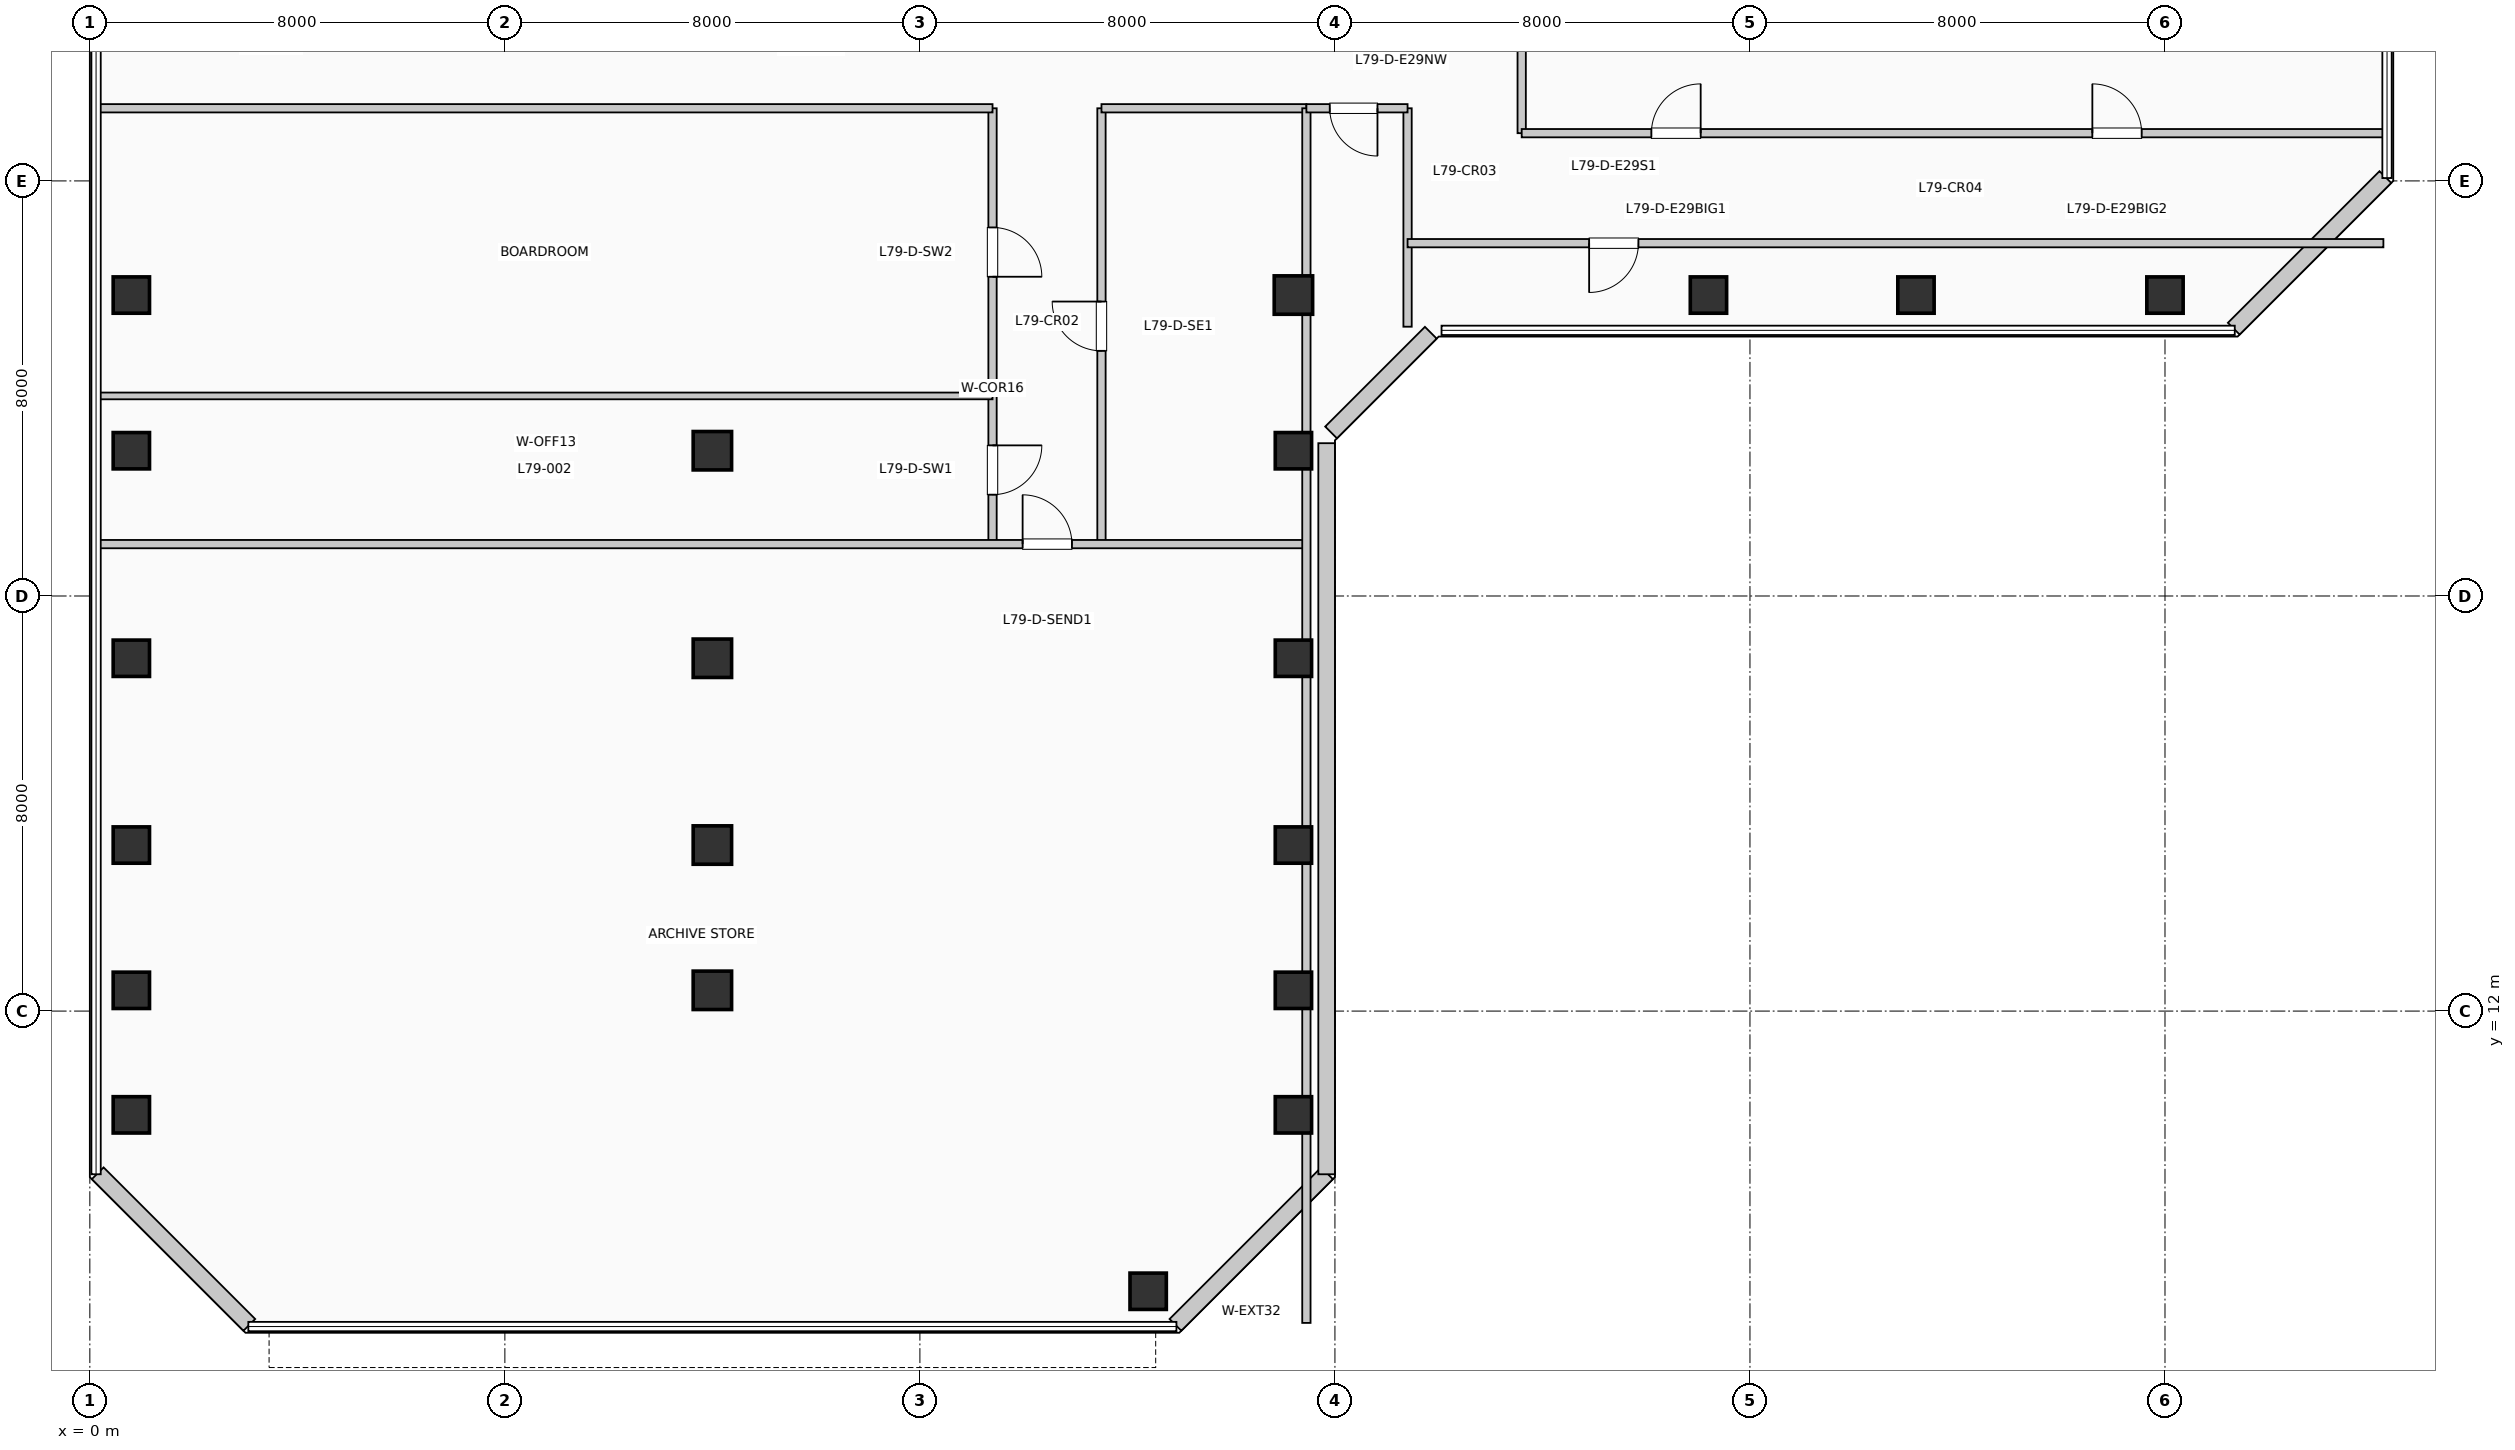
"""IFC4 building model, lengths in metres.
Left out: names, types, materials, properties, quantities, classifications, styles, units other than length and angle.
Written with IfcOpenShell. Run it as: python <this file> out.ifc"""

import sys

from ifc_helpers import new_model, si_unit, direction, frame, frame_2d, origin, origin_2d, place, context, subcontext, project, spatial, rectangle, extrude, element, fill, save


model = new_model("IFC4")
c1 = context("Model", 3, precision=1e-05, world=origin(), true_north=direction((0.0, 1.0)))
c2 = subcontext(c1, "Body", "Model", "MODEL_VIEW")
j1 = project(units=[si_unit("LENGTHUNIT", "METRE"), si_unit("PLANEANGLEUNIT", "RADIAN")], contexts=[c1])
p1 = place(None, origin())
s1 = spatial("IfcSite", under=j1, at=p1, CompositionType="ELEMENT")
p2 = place(p1, origin())
s2 = spatial("IfcBuilding", under=s1, at=p2, CompositionType="ELEMENT")
p3 = place(p2, frame((0.0, 0.0, 323.73)))
s3 = spatial("IfcBuildingStorey", under=s2, at=p3, CompositionType="ELEMENT", Elevation=323.73)
for number, where, z_axis, x_axis in (
    (1, (0.8, 10.0, 0.0), (0.0, 0.0, 1.0), (1.0, 0.0, 0.0)),
    (2, (0.8, 12.4, 0.0), (0.0, 0.0, 1.0), (1.0, 0.0, 0.0)),
    (3, (0.8, 15.2, 0.0), (0.0, 0.0, 1.0), (1.0, 0.0, 0.0)),
    (4, (0.8, 18.8, 0.0), (0.0, 0.0, 1.0), (1.0, 0.0, 0.0)),
    (5, (0.8, 22.8, 0.0), (0.0, 0.0, 1.0), (1.0, 0.0, 0.0)),
    (6, (0.8, 25.8, 0.0), (0.0, 0.0, 1.0), (1.0, 0.0, 0.0)),
):
    element("IfcColumn", number, at=place(p3, frame(where, z_axis=z_axis, x_axis=x_axis)), inside=s3, PredefinedType="COLUMN", context=c2, shape_type="SweptSolid", body=[
        extrude(rectangle(XDim=0.7, YDim=0.7, at=origin_2d()), origin(), (0.0, 0.0, 1.0), 3.96),
    ])
for number, where, z_axis, x_axis in (
    (7, (12.0, 12.4, 0.0), (0.0, 0.0, 1.0), (1.0, 0.0, 0.0)),
    (8, (12.0, 15.2, 0.0), (0.0, 0.0, 1.0), (1.0, 0.0, 0.0)),
    (9, (12.0, 18.8, 0.0), (0.0, 0.0, 1.0), (1.0, 0.0, 0.0)),
    (10, (12.0, 22.8, 0.0), (0.0, 0.0, 1.0), (1.0, 0.0, 0.0)),
):
    element("IfcColumn", number, at=place(p3, frame(where, z_axis=z_axis, x_axis=x_axis)), inside=s3, PredefinedType="COLUMN", context=c2, shape_type="SweptSolid", body=[
        extrude(rectangle(XDim=0.74, YDim=0.74, at=origin_2d()), origin(), (0.0, 0.0, 1.0), 3.96),
    ])
for number, where, z_axis, x_axis in (
    (11, (20.4, 6.6, 0.0), (0.0, 0.0, 1.0), (1.0, 0.0, 0.0)),
    (12, (23.2, 10.0, 0.0), (0.0, 0.0, 1.0), (1.0, 0.0, 0.0)),
    (13, (23.2, 12.4, 0.0), (0.0, 0.0, 1.0), (1.0, 0.0, 0.0)),
    (14, (23.2, 15.2, 0.0), (0.0, 0.0, 1.0), (1.0, 0.0, 0.0)),
    (15, (23.2, 18.8, 0.0), (0.0, 0.0, 1.0), (1.0, 0.0, 0.0)),
    (16, (23.2, 22.8, 0.0), (0.0, 0.0, 1.0), (1.0, 0.0, 0.0)),
):
    element("IfcColumn", number, at=place(p3, frame(where, z_axis=z_axis, x_axis=x_axis)), inside=s3, PredefinedType="COLUMN", context=c2, shape_type="SweptSolid", body=[
        extrude(rectangle(XDim=0.7, YDim=0.7, at=origin_2d()), origin(), (0.0, 0.0, 1.0), 3.96),
    ])
p4 = place(p3, frame((23.2, 25.8, 0.0), z_axis=(0.0, 0.0, 1.0), x_axis=(1.0, 0.0, 0.0)))
e17 = element("IfcColumn", 17, at=p4, inside=s3, PredefinedType="COLUMN", context=c2, shape_type="SweptSolid", body=[
    extrude(rectangle(XDim=0.74, YDim=0.74, at=origin_2d()), origin(), (0.0, 0.0, 1.0), 3.96),
])
for number, where, z_axis, x_axis in (
    (18, (31.2, 25.8, 0.0), (0.0, 0.0, 1.0), (1.0, 0.0, 0.0)),
    (19, (35.2, 25.8, 0.0), (0.0, 0.0, 1.0), (1.0, 0.0, 0.0)),
    (20, (40.0, 25.8, 0.0), (0.0, 0.0, 1.0), (1.0, 0.0, 0.0)),
):
    element("IfcColumn", number, at=place(p3, frame(where, z_axis=z_axis, x_axis=x_axis)), inside=s3, PredefinedType="COLUMN", context=c2, shape_type="SweptSolid", body=[
        extrude(rectangle(XDim=0.7, YDim=0.7, at=origin_2d()), origin(), (0.0, 0.0, 1.0), 3.96),
    ])
p5 = place(p3, frame((20.926, 5.952, 0.0), z_axis=(0.0, 0.0, 1.0), x_axis=(0.707077242712, 0.707136318428, 0.0)))
e21 = element("IfcWall", 21, at=p5, inside=s3, PredefinedType="SOLIDWALL", context=c2, shape_type="SweptSolid", body=[
    extrude(rectangle(XDim=4.133, YDim=0.32, at=frame_2d((2.066, 0.0))), origin(), (0.0, 0.0, 1.0), 3.74),
])
p6 = place(p3, frame((23.84, 8.855, 0.0), z_axis=(0.0, 0.0, 1.0), x_axis=(0.0, 1.0, 0.0)))
e22 = element("IfcWall", 22, at=p6, inside=s3, PredefinedType="SOLIDWALL", context=c2, shape_type="SweptSolid", body=[
    extrude(rectangle(XDim=14.09, YDim=0.32, at=frame_2d((7.045, 0.0))), origin(), (0.0, 0.0, 1.0), 3.74),
])
p7 = place(p3, frame((23.926, 23.152, 0.0), z_axis=(0.0, 0.0, 1.0), x_axis=(0.707106781187, 0.707106781187, 0.0)))
e23 = element("IfcWall", 23, at=p7, inside=s3, PredefinedType="SOLIDWALL", context=c2, shape_type="SweptSolid", body=[
    extrude(rectangle(XDim=2.718, YDim=0.32, at=frame_2d((1.359, 0.0))), origin(), (0.0, 0.0, 1.0), 3.74),
])
for number, where, z_axis, x_axis in (
    (24, (41.326, 25.152, 0.0), (0.0, 0.0, 1.0), (0.707, 0.707, 0.0)),
    (25, (0.152, 8.874, 0.0), (0.0, 0.0, 1.0), (0.707, -0.707, 0.0)),
):
    element("IfcWall", number, at=place(p3, frame(where, z_axis=z_axis, x_axis=x_axis)), inside=s3, PredefinedType="SOLIDWALL", context=c2, shape_type="SweptSolid", body=[
        extrude(rectangle(XDim=4.133, YDim=0.32, at=frame_2d((2.066, 0.0))), origin(), (0.0, 0.0, 1.0), 3.74),
    ])
p8 = place(p3, frame((17.4, 21.0, 0.0), z_axis=(0.0, 0.0, 1.0), x_axis=(0.0, 1.0, 0.0)))
e26 = element("IfcWall", 26, at=p8, inside=s3, PredefinedType="PARTITIONING", context=c2, shape_type="SweptSolid", body=[
    extrude(rectangle(XDim=8.4, YDim=0.16, at=frame_2d((4.2, 0.0))), origin(), (0.0, 0.0, 1.0), 3.74),
])
p9 = place(p8, frame((1.903, 0.0, 0.0), z_axis=(0.0, 0.0, 1.0), x_axis=(-1.0, 0.0, 0.0)))
e27 = element("IfcOpeningElement", 27, at=p9, cuts=e26, PredefinedType="OPENING", context=c2, shape_type="SweptSolid", body=[
    extrude(rectangle(XDim=0.95, YDim=2.15, at=frame_2d((0.475, 1.075))), frame((0.0, 0.09, 0.0), z_axis=(0.0, -1.0, 0.0), x_axis=(1.0, 0.0, 0.0)), (0.0, 0.0, 1.0), 0.18),
])
p10 = place(p8, frame((6.103, 0.0, 0.0), z_axis=(0.0, 0.0, 1.0), x_axis=(-1.0, 0.0, 0.0)))
e28 = element("IfcOpeningElement", 28, at=p10, cuts=e26, PredefinedType="OPENING", context=c2, shape_type="SweptSolid", body=[
    extrude(rectangle(XDim=0.95, YDim=2.15, at=frame_2d((0.475, 1.075))), frame((0.0, 0.09, 0.0), z_axis=(0.0, -1.0, 0.0), x_axis=(1.0, 0.0, 0.0)), (0.0, 0.0, 1.0), 0.18),
])
p11 = place(p3, frame((19.5, 21.0, 0.0), z_axis=(0.0, 0.0, 1.0), x_axis=(0.0, 1.0, 0.0)))
e29 = element("IfcWall", 29, at=p11, inside=s3, PredefinedType="PARTITIONING", context=c2, shape_type="SweptSolid", body=[
    extrude(rectangle(XDim=8.4, YDim=0.16, at=frame_2d((4.2, 0.0))), origin(), (0.0, 0.0, 1.0), 3.74),
])
p12 = place(p11, frame((3.725, 0.0, 0.0)))
e30 = element("IfcOpeningElement", 30, at=p12, cuts=e29, PredefinedType="OPENING", context=c2, shape_type="SweptSolid", body=[
    extrude(rectangle(XDim=0.95, YDim=2.15, at=frame_2d((0.475, 1.075))), frame((0.0, 0.09, 0.0), z_axis=(0.0, -1.0, 0.0), x_axis=(1.0, 0.0, 0.0)), (0.0, 0.0, 1.0), 0.18),
])
p13 = place(p3, frame((0.19, 21.0, 0.0), z_axis=(0.0, 0.0, 1.0), x_axis=(1.0, 0.0, 0.0)))
e31 = element("IfcWall", 31, at=p13, inside=s3, PredefinedType="PARTITIONING", context=c2, shape_type="SweptSolid", body=[
    extrude(rectangle(XDim=23.26, YDim=0.16, at=frame_2d((11.63, 0.0))), origin(), (0.0, 0.0, 1.0), 3.74),
])
p14 = place(p13, frame((17.79, 0.0, 0.0)))
e32 = element("IfcOpeningElement", 32, at=p14, cuts=e31, PredefinedType="OPENING", context=c2, shape_type="SweptSolid", body=[
    extrude(rectangle(XDim=0.95, YDim=2.15, at=frame_2d((0.475, 1.075))), frame((0.0, 0.09, 0.0), z_axis=(0.0, -1.0, 0.0), x_axis=(1.0, 0.0, 0.0)), (0.0, 0.0, 1.0), 0.18),
])
p15 = place(p3, frame((0.19, 29.4, 0.0), z_axis=(0.0, 0.0, 1.0), x_axis=(1.0, 0.0, 0.0)))
e33 = element("IfcWall", 33, at=p15, inside=s3, PredefinedType="PARTITIONING", context=c2, shape_type="SweptSolid", body=[
    extrude(rectangle(XDim=17.21, YDim=0.16, at=frame_2d((8.605, 0.0))), origin(), (0.0, 0.0, 1.0), 3.425),
])
p16 = place(p3, frame((19.5, 29.4, 0.0), z_axis=(0.0, 0.0, 1.0), x_axis=(1.0, 0.0, 0.0)))
e34 = element("IfcWall", 34, at=p16, inside=s3, PredefinedType="PARTITIONING", context=c2, shape_type="SweptSolid", body=[
    extrude(rectangle(XDim=3.95, YDim=0.16, at=frame_2d((1.975, 0.0))), origin(), (0.0, 0.0, 1.0), 3.425),
])
p17 = place(p3, frame((23.45, 5.99, 0.0), z_axis=(0.0, 0.0, 1.0), x_axis=(0.0, 1.0, 0.0)))
e35 = element("IfcWall", 35, at=p17, inside=s3, PredefinedType="PARTITIONING", context=c2, shape_type="SweptSolid", body=[
    extrude(rectangle(XDim=23.41, YDim=0.16, at=frame_2d((11.705, 0.0))), origin(), (0.0, 0.0, 1.0), 3.175),
])
p18 = place(p3, frame((0.19, 23.856, 0.0), z_axis=(0.0, 0.0, 1.0), x_axis=(1.0, 0.0, 0.0)))
e36 = element("IfcWall", 36, at=p18, inside=s3, PredefinedType="PARTITIONING", context=c2, shape_type="SweptSolid", body=[
    extrude(rectangle(XDim=17.21, YDim=0.13, at=frame_2d((8.605, 0.0))), origin(), (0.0, 0.0, 1.0), 3.74),
])
p19 = place(p3, frame((25.4, 25.19, 0.0), z_axis=(0.0, 0.0, 1.0), x_axis=(0.0, 1.0, 0.0)))
e37 = element("IfcWall", 37, at=p19, inside=s3, PredefinedType="PARTITIONING", context=c2, shape_type="SweptSolid", body=[
    extrude(rectangle(XDim=4.21, YDim=0.16, at=frame_2d((2.105, 0.0))), origin(), (0.0, 0.0, 1.0), 3.74),
])
p20 = place(p3, frame((27.6, 28.92, 0.0), z_axis=(0.0, 0.0, 1.0), x_axis=(0.0, 1.0, 0.0)))
e38 = element("IfcWall", 38, at=p20, inside=s3, PredefinedType="PARTITIONING", context=c2, shape_type="SweptSolid", body=[
    extrude(rectangle(XDim=16.89, YDim=0.16, at=frame_2d((8.445, 0.0))), origin(), (0.0, 0.0, 1.0), 3.74),
])
p21 = place(p3, frame((25.4, 26.8, 0.0), z_axis=(0.0, 0.0, 1.0), x_axis=(1.0, 0.0, 0.0)))
e39 = element("IfcWall", 39, at=p21, inside=s3, PredefinedType="PARTITIONING", context=c2, shape_type="SweptSolid", body=[
    extrude(rectangle(XDim=18.81, YDim=0.16, at=frame_2d((9.405, 0.0))), origin(), (0.0, 0.0, 1.0), 3.74),
])
p22 = place(p21, frame((4.45, 0.0, 0.0), z_axis=(0.0, 0.0, 1.0), x_axis=(-1.0, 0.0, 0.0)))
e40 = element("IfcOpeningElement", 40, at=p22, cuts=e39, PredefinedType="OPENING", context=c2, shape_type="SweptSolid", body=[
    extrude(rectangle(XDim=0.95, YDim=2.15, at=frame_2d((0.475, 1.075))), frame((0.0, 0.09, 0.0), z_axis=(0.0, -1.0, 0.0), x_axis=(1.0, 0.0, 0.0)), (0.0, 0.0, 1.0), 0.18),
])
p23 = place(p3, frame((27.6, 28.92, 0.0), z_axis=(0.0, 0.0, 1.0), x_axis=(1.0, 0.0, 0.0)))
e41 = element("IfcWall", 41, at=p23, inside=s3, PredefinedType="PARTITIONING", context=c2, shape_type="SweptSolid", body=[
    extrude(rectangle(XDim=16.61, YDim=0.16, at=frame_2d((8.305, 0.0))), origin(), (0.0, 0.0, 1.0), 3.74),
])
p24 = place(p23, frame((2.5, 0.0, 0.0)))
e42 = element("IfcOpeningElement", 42, at=p24, cuts=e41, PredefinedType="OPENING", context=c2, shape_type="SweptSolid", body=[
    extrude(rectangle(XDim=0.95, YDim=2.15, at=frame_2d((0.475, 1.075))), frame((0.0, 0.09, 0.0), z_axis=(0.0, -1.0, 0.0), x_axis=(1.0, 0.0, 0.0)), (0.0, 0.0, 1.0), 0.18),
])
p25 = place(p23, frame((11.0, 0.0, 0.0)))
e43 = element("IfcOpeningElement", 43, at=p25, cuts=e41, PredefinedType="OPENING", context=c2, shape_type="SweptSolid", body=[
    extrude(rectangle(XDim=0.95, YDim=2.15, at=frame_2d((0.475, 1.075))), frame((0.0, 0.09, 0.0), z_axis=(0.0, -1.0, 0.0), x_axis=(1.0, 0.0, 0.0)), (0.0, 0.0, 1.0), 0.18),
])
p26 = place(p3, frame((23.45, 29.4, 0.0), z_axis=(0.0, 0.0, 1.0), x_axis=(1.0, 0.0, 0.0)))
e44 = element("IfcWall", 44, at=p26, inside=s3, PredefinedType="PARTITIONING", context=c2, shape_type="SweptSolid", body=[
    extrude(rectangle(XDim=1.95, YDim=0.16, at=frame_2d((0.975, 0.0))), origin(), (0.0, 0.0, 1.0), 3.425),
])
p27 = place(p26, frame((1.37, 0.0, 0.0), z_axis=(0.0, 0.0, 1.0), x_axis=(-1.0, 0.0, 0.0)))
e45 = element("IfcOpeningElement", 45, at=p27, cuts=e44, PredefinedType="OPENING", context=c2, shape_type="SweptSolid", body=[
    extrude(rectangle(XDim=0.92, YDim=2.1, at=frame_2d((0.46, 1.05))), frame((0.0, 0.09, 0.0), z_axis=(0.0, -1.0, 0.0), x_axis=(1.0, 0.0, 0.0)), (0.0, 0.0, 1.0), 0.18),
])
p28 = place(p14, origin())
e46 = element("IfcDoor", 46, at=p28, inside=s3, OperationType="SINGLE_SWING_LEFT", PredefinedType="DOOR", context=c2, shape_type="SweptSolid", body=[
    extrude(rectangle(XDim=0.95, YDim=2.15, at=frame_2d((0.475, 1.075))), frame((0.0, 0.025, 0.0), z_axis=(0.0, -1.0, 0.0), x_axis=(1.0, 0.0, 0.0)), (0.0, 0.0, 1.0), 0.05),
])
fill(e32, e46)
p29 = place(p9, origin())
e47 = element("IfcDoor", 47, at=p29, inside=s3, OperationType="SINGLE_SWING_RIGHT", PredefinedType="DOOR", context=c2, shape_type="SweptSolid", body=[
    extrude(rectangle(XDim=0.95, YDim=2.15, at=frame_2d((0.475, 1.075))), frame((0.0, 0.025, 0.0), z_axis=(0.0, -1.0, 0.0), x_axis=(1.0, 0.0, 0.0)), (0.0, 0.0, 1.0), 0.05),
])
fill(e27, e47)
p30 = place(p10, origin())
e48 = element("IfcDoor", 48, at=p30, inside=s3, OperationType="SINGLE_SWING_LEFT", PredefinedType="DOOR", context=c2, shape_type="SweptSolid", body=[
    extrude(rectangle(XDim=0.95, YDim=2.15, at=frame_2d((0.475, 1.075))), frame((0.0, 0.025, 0.0), z_axis=(0.0, -1.0, 0.0), x_axis=(1.0, 0.0, 0.0)), (0.0, 0.0, 1.0), 0.05),
])
fill(e28, e48)
p31 = place(p12, origin())
e49 = element("IfcDoor", 49, at=p31, inside=s3, OperationType="SINGLE_SWING_RIGHT", PredefinedType="DOOR", context=c2, shape_type="SweptSolid", body=[
    extrude(rectangle(XDim=0.95, YDim=2.15, at=frame_2d((0.475, 1.075))), frame((0.0, 0.025, 0.0), z_axis=(0.0, -1.0, 0.0), x_axis=(1.0, 0.0, 0.0)), (0.0, 0.0, 1.0), 0.05),
])
fill(e30, e49)
p32 = place(p24, origin())
e50 = element("IfcDoor", 50, at=p32, inside=s3, OperationType="SINGLE_SWING_RIGHT", PredefinedType="DOOR", context=c2, shape_type="SweptSolid", body=[
    extrude(rectangle(XDim=0.95, YDim=2.15, at=frame_2d((0.475, 1.075))), frame((0.0, 0.025, 0.0), z_axis=(0.0, -1.0, 0.0), x_axis=(1.0, 0.0, 0.0)), (0.0, 0.0, 1.0), 0.05),
])
fill(e42, e50)
p33 = place(p25, origin())
e51 = element("IfcDoor", 51, at=p33, inside=s3, OperationType="SINGLE_SWING_LEFT", PredefinedType="DOOR", context=c2, shape_type="SweptSolid", body=[
    extrude(rectangle(XDim=0.95, YDim=2.15, at=frame_2d((0.475, 1.075))), frame((0.0, 0.025, 0.0), z_axis=(0.0, -1.0, 0.0), x_axis=(1.0, 0.0, 0.0)), (0.0, 0.0, 1.0), 0.05),
])
fill(e43, e51)
p34 = place(p27, origin())
e52 = element("IfcDoor", 52, at=p34, inside=s3, OperationType="SINGLE_SWING_RIGHT", PredefinedType="DOOR", context=c2, shape_type="SweptSolid", body=[
    extrude(rectangle(XDim=0.92, YDim=2.1, at=frame_2d((0.46, 1.05))), frame((0.0, 0.025, 0.0), z_axis=(0.0, -1.0, 0.0), x_axis=(1.0, 0.0, 0.0)), (0.0, 0.0, 1.0), 0.05),
])
fill(e45, e52)
p35 = place(p22, origin())
e53 = element("IfcDoor", 53, at=p35, inside=s3, OperationType="SINGLE_SWING_LEFT", PredefinedType="DOOR", context=c2, shape_type="SweptSolid", body=[
    extrude(rectangle(XDim=0.95, YDim=2.15, at=frame_2d((0.475, 1.075))), frame((0.0, 0.025, 0.0), z_axis=(0.0, -1.0, 0.0), x_axis=(1.0, 0.0, 0.0)), (0.0, 0.0, 1.0), 0.05),
])
fill(e40, e53)
save(model, sys.argv[1])
